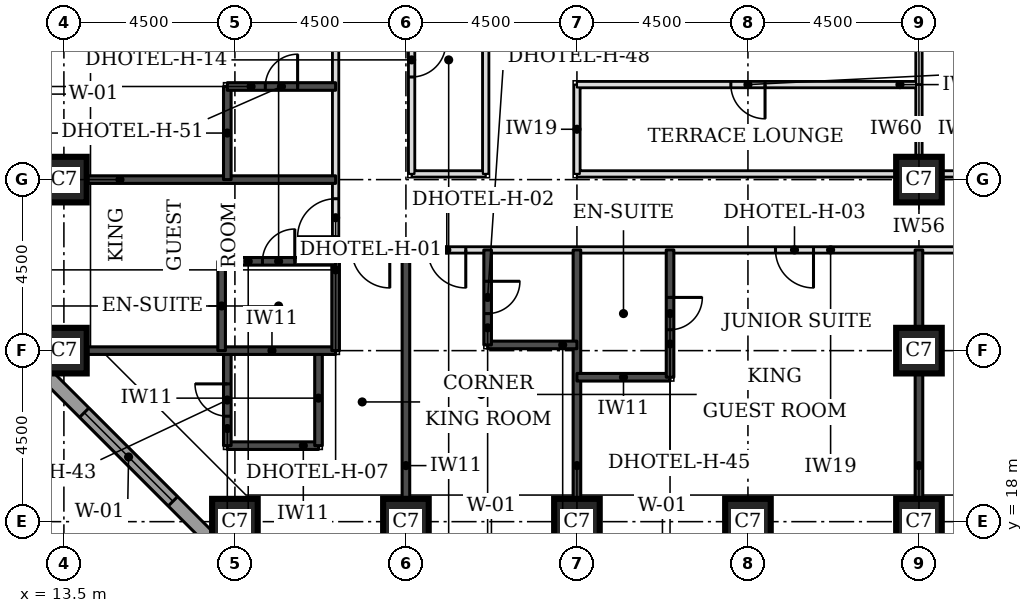
"""IFC4 building model, lengths in metres.
Left out: names, types, materials, properties, quantities, classifications, styles, units other than length and angle.
Written with IfcOpenShell. Run it as: python <this file> out.ifc"""

import sys

from ifc_helpers import new_model, si_unit, direction, frame, frame_2d, origin, origin_2d, place, context, subcontext, project, spatial, rectangle, extrude, element, fill, save


model = new_model("IFC4")
c1 = context("Model", 3, precision=1e-05, world=origin(), true_north=direction((0.0, 1.0)))
c2 = subcontext(c1, "Body", "Model", "MODEL_VIEW")
j1 = project(units=[si_unit("LENGTHUNIT", "METRE"), si_unit("PLANEANGLEUNIT", "RADIAN")], contexts=[c1])
p1 = place(None, origin())
s1 = spatial("IfcSite", under=j1, at=p1, CompositionType="ELEMENT")
p2 = place(p1, origin())
s2 = spatial("IfcBuilding", under=s1, at=p2, CompositionType="ELEMENT")
p3 = place(p2, frame((0.0, 0.0, 46.2)))
s3 = spatial("IfcBuildingStorey", under=s2, at=p3, CompositionType="ELEMENT", Elevation=46.2)
for number, where, z_axis, x_axis in (
    (1, (18.0, 18.0, 0.0), (0.0, 0.0, 1.0), (1.0, 0.0, 0.0)),
    (2, (22.5, 18.0, 0.0), (0.0, 0.0, 1.0), (1.0, 0.0, 0.0)),
    (3, (27.0, 18.0, 0.0), (0.0, 0.0, 1.0), (1.0, 0.0, 0.0)),
    (4, (31.5, 18.0, 0.0), (0.0, 0.0, 1.0), (1.0, 0.0, 0.0)),
    (5, (36.0, 18.0, 0.0), (0.0, 0.0, 1.0), (1.0, 0.0, 0.0)),
    (6, (13.5, 22.5, 0.0), (0.0, 0.0, 1.0), (1.0, 0.0, 0.0)),
    (7, (36.0, 22.5, 0.0), (0.0, 0.0, 1.0), (1.0, 0.0, 0.0)),
    (8, (13.5, 27.0, 0.0), (0.0, 0.0, 1.0), (1.0, 0.0, 0.0)),
    (9, (36.0, 27.0, 0.0), (0.0, 0.0, 1.0), (1.0, 0.0, 0.0)),
):
    element("IfcColumn", number, at=place(p3, frame(where, z_axis=z_axis, x_axis=x_axis)), inside=s3, PredefinedType="COLUMN", context=c2, shape_type="SweptSolid", body=[
        extrude(rectangle(XDim=1.2, YDim=1.2, at=origin_2d()), origin(), (0.0, 0.0, 1.0), 3.3),
    ])
p4 = place(p3, frame((12.674, 22.23, 0.0), z_axis=(0.0, 0.0, 1.0), x_axis=(0.707106781187, -0.707106781187, 0.0)))
e10 = element("IfcWall", 10, at=p4, inside=s3, PredefinedType="STANDARD", context=c2, shape_type="SweptSolid", body=[
    extrude(rectangle(XDim=7.151, YDim=0.35, at=frame_2d((3.576, 0.0))), origin(), (0.0, 0.0, 1.0), 3.055),
])
p5 = place(p4, frame((1.926, 0.0, 0.8)))
e11 = element("IfcOpeningElement", 11, at=p5, cuts=e10, PredefinedType="OPENING", context=c2, shape_type="SweptSolid", body=[
    extrude(rectangle(XDim=3.3, YDim=1.5, at=frame_2d((1.65, 0.75))), frame((0.0, 0.185, 0.0), z_axis=(0.0, -1.0, 0.0), x_axis=(1.0, 0.0, 0.0)), (0.0, 0.0, 1.0), 0.37),
])
p6 = place(p3, frame((20.65, 25.15, 0.0), z_axis=(0.0, 0.0, 1.0), x_axis=(1.0, 0.0, 0.0)))
e12 = element("IfcWall", 12, at=p6, inside=s3, PredefinedType="PARTITIONING", context=c2, shape_type="SweptSolid", body=[
    extrude(rectangle(XDim=30.85, YDim=0.15, at=frame_2d((15.425, 0.0))), origin(), (0.0, 0.0, 1.0), 3.08),
])
p7 = place(p6, frame((2.425, 0.0, 0.0)))
e13 = element("IfcOpeningElement", 13, at=p7, cuts=e12, PredefinedType="OPENING", context=c2, shape_type="SweptSolid", body=[
    extrude(rectangle(XDim=1.0, YDim=2.1, at=frame_2d((0.5, 1.05))), frame((0.0, 0.085, 0.0), z_axis=(0.0, -1.0, 0.0), x_axis=(1.0, 0.0, 0.0)), (0.0, 0.0, 1.0), 0.17),
])
p8 = place(p6, frame((11.575, 0.0, 0.0)))
e14 = element("IfcOpeningElement", 14, at=p8, cuts=e12, PredefinedType="OPENING", context=c2, shape_type="SweptSolid", body=[
    extrude(rectangle(XDim=1.0, YDim=2.1, at=frame_2d((0.5, 1.05))), frame((0.0, 0.085, 0.0), z_axis=(0.0, -1.0, 0.0), x_axis=(1.0, 0.0, 0.0)), (0.0, 0.0, 1.0), 0.17),
])
p9 = place(p6, frame((17.875, 0.0, 0.0)))
e15 = element("IfcOpeningElement", 15, at=p9, cuts=e12, PredefinedType="OPENING", context=c2, shape_type="SweptSolid", body=[
    extrude(rectangle(XDim=1.0, YDim=2.1, at=frame_2d((0.5, 1.05))), frame((0.0, 0.085, 0.0), z_axis=(0.0, -1.0, 0.0), x_axis=(1.0, 0.0, 0.0)), (0.0, 0.0, 1.0), 0.17),
])
p10 = place(p6, frame((27.025, 0.0, 0.0)))
e16 = element("IfcOpeningElement", 16, at=p10, cuts=e12, PredefinedType="OPENING", context=c2, shape_type="SweptSolid", body=[
    extrude(rectangle(XDim=1.0, YDim=2.1, at=frame_2d((0.5, 1.05))), frame((0.0, 0.085, 0.0), z_axis=(0.0, -1.0, 0.0), x_axis=(1.0, 0.0, 0.0)), (0.0, 0.0, 1.0), 0.17),
])
p11 = place(p6, frame((0.425, 0.0, 0.0)))
e17 = element("IfcOpeningElement", 17, at=p11, cuts=e12, PredefinedType="OPENING", context=c2, shape_type="SweptSolid", body=[
    extrude(rectangle(XDim=1.0, YDim=2.1, at=frame_2d((0.5, 1.05))), frame((0.0, 0.085, 0.0), z_axis=(0.0, -1.0, 0.0), x_axis=(1.0, 0.0, 0.0)), (0.0, 0.0, 1.0), 0.17),
])
p12 = place(p6, frame((29.35, 0.0, 0.0)))
e18 = element("IfcOpeningElement", 18, at=p12, cuts=e12, PredefinedType="OPENING", context=c2, shape_type="SweptSolid", body=[
    extrude(rectangle(XDim=1.0, YDim=2.1, at=frame_2d((0.5, 1.05))), frame((0.0, 0.085, 0.0), z_axis=(0.0, -1.0, 0.0), x_axis=(1.0, 0.0, 0.0)), (0.0, 0.0, 1.0), 0.17),
])
p13 = place(p3, frame((20.65, 25.15, 0.0), z_axis=(0.0, 0.0, 1.0), x_axis=(0.0, 1.0, 0.0)))
e19 = element("IfcWall", 19, at=p13, inside=s3, PredefinedType="PARTITIONING", context=c2, shape_type="SweptSolid", body=[
    extrude(rectangle(XDim=24.35, YDim=0.15, at=frame_2d((12.175, 0.0))), origin(), (0.0, 0.0, 1.0), 3.08),
])
p14 = place(p13, frame((0.347, 0.0, 0.0)))
e20 = element("IfcOpeningElement", 20, at=p14, cuts=e19, PredefinedType="OPENING", context=c2, shape_type="SweptSolid", body=[
    extrude(rectangle(XDim=1.0, YDim=2.1, at=frame_2d((0.5, 1.05))), frame((0.0, 0.085, 0.0), z_axis=(0.0, -1.0, 0.0), x_axis=(1.0, 0.0, 0.0)), (0.0, 0.0, 1.0), 0.17),
])
p15 = place(p13, frame((7.075, 0.0, 0.0)))
e21 = element("IfcOpeningElement", 21, at=p15, cuts=e19, PredefinedType="OPENING", context=c2, shape_type="SweptSolid", body=[
    extrude(rectangle(XDim=1.0, YDim=2.1, at=frame_2d((0.5, 1.05))), frame((0.0, 0.085, 0.0), z_axis=(0.0, -1.0, 0.0), x_axis=(1.0, 0.0, 0.0)), (0.0, 0.0, 1.0), 0.17),
])
p16 = place(p13, frame((13.375, 0.0, 0.0)))
e22 = element("IfcOpeningElement", 22, at=p16, cuts=e19, PredefinedType="OPENING", context=c2, shape_type="SweptSolid", body=[
    extrude(rectangle(XDim=1.0, YDim=2.1, at=frame_2d((0.5, 1.05))), frame((0.0, 0.085, 0.0), z_axis=(0.0, -1.0, 0.0), x_axis=(1.0, 0.0, 0.0)), (0.0, 0.0, 1.0), 0.17),
])
p17 = place(p13, frame((21.54, 0.0, 0.0)))
e23 = element("IfcOpeningElement", 23, at=p17, cuts=e19, PredefinedType="OPENING", context=c2, shape_type="SweptSolid", body=[
    extrude(rectangle(XDim=0.9, YDim=2.1, at=frame_2d((0.45, 1.05))), frame((0.0, 0.085, 0.0), z_axis=(0.0, -1.0, 0.0), x_axis=(1.0, 0.0, 0.0)), (0.0, 0.0, 1.0), 0.17),
])
p18 = place(p3, frame((22.65, 27.15, 0.0), z_axis=(0.0, 0.0, 1.0), x_axis=(1.0, 0.0, 0.0)))
e24 = element("IfcWall", 24, at=p18, inside=s3, PredefinedType="PARTITIONING", context=c2, shape_type="SweptSolid", body=[
    extrude(rectangle(XDim=1.95, YDim=0.15, at=frame_2d((0.975, 0.0))), origin(), (0.0, 0.0, 1.0), 3.08),
])
p19 = place(p3, frame((22.65, 27.15, 0.0), z_axis=(0.0, 0.0, 1.0), x_axis=(0.0, 1.0, 0.0)))
e25 = element("IfcWall", 25, at=p19, inside=s3, PredefinedType="PARTITIONING", context=c2, shape_type="SweptSolid", body=[
    extrude(rectangle(XDim=15.85, YDim=0.15, at=frame_2d((7.925, 0.0))), origin(), (0.0, 0.0, 1.0), 3.08),
])
p20 = place(p19, frame((2.55, 0.0, 0.0)))
e26 = element("IfcOpeningElement", 26, at=p20, cuts=e25, PredefinedType="OPENING", context=c2, shape_type="SweptSolid", body=[
    extrude(rectangle(XDim=0.9, YDim=2.1, at=frame_2d((0.45, 1.05))), frame((0.0, 0.085, 0.0), z_axis=(0.0, -1.0, 0.0), x_axis=(1.0, 0.0, 0.0)), (0.0, 0.0, 1.0), 0.17),
])
p21 = place(p19, frame((9.225, 0.0, 0.0)))
e27 = element("IfcOpeningElement", 27, at=p21, cuts=e25, PredefinedType="OPENING", context=c2, shape_type="SweptSolid", body=[
    extrude(rectangle(XDim=0.9, YDim=2.1, at=frame_2d((0.45, 1.05))), frame((0.0, 0.085, 0.0), z_axis=(0.0, -1.0, 0.0), x_axis=(1.0, 0.0, 0.0)), (0.0, 0.0, 1.0), 0.17),
])
p22 = place(p3, frame((24.6, 27.15, 0.0), z_axis=(0.0, 0.0, 1.0), x_axis=(0.0, 1.0, 0.0)))
e28 = element("IfcWall", 28, at=p22, inside=s3, PredefinedType="PARTITIONING", context=c2, shape_type="SweptSolid", body=[
    extrude(rectangle(XDim=13.35, YDim=0.15, at=frame_2d((6.675, 0.0))), origin(), (0.0, 0.0, 1.0), 3.08),
])
p23 = place(p3, frame((27.0, 27.15, 0.0), z_axis=(0.0, 0.0, 1.0), x_axis=(1.0, 0.0, 0.0)))
e29 = element("IfcWall", 29, at=p23, inside=s3, PredefinedType="PARTITIONING", context=c2, shape_type="SweptSolid", body=[
    extrude(rectangle(XDim=11.5, YDim=0.15, at=frame_2d((5.75, 0.0))), origin(), (0.0, 0.0, 1.0), 3.08),
])
p24 = place(p3, frame((27.0, 27.15, 0.0), z_axis=(0.0, 0.0, 1.0), x_axis=(0.0, 1.0, 0.0)))
e30 = element("IfcWall", 30, at=p24, inside=s3, PredefinedType="PARTITIONING", context=c2, shape_type="SweptSolid", body=[
    extrude(rectangle(XDim=2.35, YDim=0.15, at=frame_2d((1.175, 0.0))), origin(), (0.0, 0.0, 1.0), 3.08),
])
p25 = place(p3, frame((27.0, 29.5, 0.0), z_axis=(0.0, 0.0, 1.0), x_axis=(1.0, 0.0, 0.0)))
e31 = element("IfcWall", 31, at=p25, inside=s3, PredefinedType="PARTITIONING", context=c2, shape_type="SweptSolid", body=[
    extrude(rectangle(XDim=9.0, YDim=0.15, at=frame_2d((4.5, 0.0))), origin(), (0.0, 0.0, 1.0), 3.08),
])
p26 = place(p25, frame((4.05, 0.0, 0.0)))
e32 = element("IfcOpeningElement", 32, at=p26, cuts=e31, PredefinedType="OPENING", context=c2, shape_type="SweptSolid", body=[
    extrude(rectangle(XDim=0.9, YDim=2.1, at=frame_2d((0.45, 1.05))), frame((0.0, 0.085, 0.0), z_axis=(0.0, -1.0, 0.0), x_axis=(1.0, 0.0, 0.0)), (0.0, 0.0, 1.0), 0.17),
])
p27 = place(p3, frame((36.0, 29.5, 0.0), z_axis=(0.0, 0.0, 1.0), x_axis=(0.0, 1.0, 0.0)))
e33 = element("IfcWall", 33, at=p27, inside=s3, PredefinedType="PARTITIONING", context=c2, shape_type="SweptSolid", body=[
    extrude(rectangle(XDim=1.95, YDim=0.15, at=frame_2d((0.975, 0.0))), origin(), (0.0, 0.0, 1.0), 2.33),
])
for number, where, z_axis, x_axis in (
    (34, (22.5, 18.6, 0.0), (0.0, 0.0, 1.0), (0.0, 1.0, 0.0)),
    (35, (27.0, 18.6, 0.0), (0.0, 0.0, 1.0), (0.0, 1.0, 0.0)),
    (36, (36.0, 18.6, 0.0), (0.0, 0.0, 1.0), (0.0, 1.0, 0.0)),
):
    element("IfcWall", number, at=place(p3, frame(where, z_axis=z_axis, x_axis=x_axis)), inside=s3, PredefinedType="SOLIDWALL", context=c2, shape_type="SweptSolid", body=[
        extrude(rectangle(XDim=6.55, YDim=0.2, at=frame_2d((3.275, 0.0))), origin(), (0.0, 0.0, 1.0), 3.08),
    ])
p28 = place(p3, frame((17.8, 20.0, 0.0), z_axis=(0.0, 0.0, 1.0), x_axis=(1.0, 0.0, 0.0)))
e37 = element("IfcWall", 37, at=p28, inside=s3, PredefinedType="SOLIDWALL", context=c2, shape_type="SweptSolid", body=[
    extrude(rectangle(XDim=2.4, YDim=0.2, at=frame_2d((1.2, 0.0))), origin(), (0.0, 0.0, 1.0), 3.08),
])
p29 = place(p3, frame((17.8, 20.0, 0.0), z_axis=(0.0, 0.0, 1.0), x_axis=(0.0, 1.0, 0.0)))
e38 = element("IfcWall", 38, at=p29, inside=s3, PredefinedType="SOLIDWALL", context=c2, shape_type="SweptSolid", body=[
    extrude(rectangle(XDim=2.5, YDim=0.2, at=frame_2d((1.25, 0.0))), origin(), (0.0, 0.0, 1.0), 3.08),
])
p30 = place(p29, frame((0.775, 0.0, 0.0)))
e39 = element("IfcOpeningElement", 39, at=p30, cuts=e38, PredefinedType="OPENING", context=c2, shape_type="SweptSolid", body=[
    extrude(rectangle(XDim=0.85, YDim=2.1, at=frame_2d((0.425, 1.05))), frame((0.0, 0.11, 0.0), z_axis=(0.0, -1.0, 0.0), x_axis=(1.0, 0.0, 0.0)), (0.0, 0.0, 1.0), 0.22),
])
p31 = place(p3, frame((20.2, 20.0, 0.0), z_axis=(0.0, 0.0, 1.0), x_axis=(0.0, 1.0, 0.0)))
e40 = element("IfcWall", 40, at=p31, inside=s3, PredefinedType="SOLIDWALL", context=c2, shape_type="SweptSolid", body=[
    extrude(rectangle(XDim=2.5, YDim=0.2, at=frame_2d((1.25, 0.0))), origin(), (0.0, 0.0, 1.0), 3.08),
])
p32 = place(p3, frame((27.0, 21.8, 0.0), z_axis=(0.0, 0.0, 1.0), x_axis=(1.0, 0.0, 0.0)))
e41 = element("IfcWall", 41, at=p32, inside=s3, PredefinedType="SOLIDWALL", context=c2, shape_type="SweptSolid", body=[
    extrude(rectangle(XDim=2.45, YDim=0.2, at=frame_2d((1.225, 0.0))), origin(), (0.0, 0.0, 1.0), 3.08),
])
p33 = place(p3, frame((29.45, 21.8, 0.0), z_axis=(0.0, 0.0, 1.0), x_axis=(0.0, 1.0, 0.0)))
e42 = element("IfcWall", 42, at=p33, inside=s3, PredefinedType="SOLIDWALL", context=c2, shape_type="SweptSolid", body=[
    extrude(rectangle(XDim=3.35, YDim=0.2, at=frame_2d((1.675, 0.0))), origin(), (0.0, 0.0, 1.0), 3.08),
])
p34 = place(p33, frame((1.25, 0.0, 0.0)))
e43 = element("IfcOpeningElement", 43, at=p34, cuts=e42, PredefinedType="OPENING", context=c2, shape_type="SweptSolid", body=[
    extrude(rectangle(XDim=0.85, YDim=2.1, at=frame_2d((0.425, 1.05))), frame((0.0, 0.11, 0.0), z_axis=(0.0, -1.0, 0.0), x_axis=(1.0, 0.0, 0.0)), (0.0, 0.0, 1.0), 0.22),
])
p35 = place(p3, frame((14.1, 22.5, 0.0), z_axis=(0.0, 0.0, 1.0), x_axis=(1.0, 0.0, 0.0)))
e44 = element("IfcWall", 44, at=p35, inside=s3, PredefinedType="SOLIDWALL", context=c2, shape_type="SweptSolid", body=[
    extrude(rectangle(XDim=6.55, YDim=0.2, at=frame_2d((3.275, 0.0))), origin(), (0.0, 0.0, 1.0), 3.08),
])
p36 = place(p3, frame((17.65, 22.5, 0.0), z_axis=(0.0, 0.0, 1.0), x_axis=(0.0, 1.0, 0.0)))
e45 = element("IfcWall", 45, at=p36, inside=s3, PredefinedType="SOLIDWALL", context=c2, shape_type="SweptSolid", body=[
    extrude(rectangle(XDim=2.35, YDim=0.2, at=frame_2d((1.175, 0.0))), origin(), (0.0, 0.0, 1.0), 3.08),
])
p37 = place(p3, frame((20.65, 22.5, 0.0), z_axis=(0.0, 0.0, 1.0), x_axis=(0.0, 1.0, 0.0)))
e46 = element("IfcWall", 46, at=p37, inside=s3, PredefinedType="SOLIDWALL", context=c2, shape_type="SweptSolid", body=[
    extrude(rectangle(XDim=2.65, YDim=0.2, at=frame_2d((1.325, 0.0))), origin(), (0.0, 0.0, 1.0), 3.08),
])
p38 = place(p3, frame((24.65, 22.65, 0.0), z_axis=(0.0, 0.0, 1.0), x_axis=(1.0, 0.0, 0.0)))
e47 = element("IfcWall", 47, at=p38, inside=s3, PredefinedType="SOLIDWALL", context=c2, shape_type="SweptSolid", body=[
    extrude(rectangle(XDim=2.35, YDim=0.2, at=frame_2d((1.175, 0.0))), origin(), (0.0, 0.0, 1.0), 3.08),
])
p39 = place(p3, frame((24.65, 22.65, 0.0), z_axis=(0.0, 0.0, 1.0), x_axis=(0.0, 1.0, 0.0)))
e48 = element("IfcWall", 48, at=p39, inside=s3, PredefinedType="SOLIDWALL", context=c2, shape_type="SweptSolid", body=[
    extrude(rectangle(XDim=2.5, YDim=0.2, at=frame_2d((1.25, 0.0))), origin(), (0.0, 0.0, 1.0), 3.08),
])
p40 = place(p39, frame((0.825, 0.0, 0.0)))
e49 = element("IfcOpeningElement", 49, at=p40, cuts=e48, PredefinedType="OPENING", context=c2, shape_type="SweptSolid", body=[
    extrude(rectangle(XDim=0.85, YDim=2.1, at=frame_2d((0.425, 1.05))), frame((0.0, 0.11, 0.0), z_axis=(0.0, -1.0, 0.0), x_axis=(1.0, 0.0, 0.0)), (0.0, 0.0, 1.0), 0.22),
])
p41 = place(p3, frame((17.65, 24.85, 0.0), z_axis=(0.0, 0.0, 1.0), x_axis=(1.0, 0.0, 0.0)))
e50 = element("IfcWall", 50, at=p41, inside=s3, PredefinedType="SOLIDWALL", context=c2, shape_type="SweptSolid", body=[
    extrude(rectangle(XDim=3.0, YDim=0.2, at=frame_2d((1.5, 0.0))), origin(), (0.0, 0.0, 1.0), 3.08),
])
p42 = place(p41, frame((1.075, 0.0, 0.0)))
e51 = element("IfcOpeningElement", 51, at=p42, cuts=e50, PredefinedType="OPENING", context=c2, shape_type="SweptSolid", body=[
    extrude(rectangle(XDim=0.85, YDim=2.1, at=frame_2d((0.425, 1.05))), frame((0.0, 0.11, 0.0), z_axis=(0.0, -1.0, 0.0), x_axis=(1.0, 0.0, 0.0)), (0.0, 0.0, 1.0), 0.22),
])
p43 = place(p3, frame((14.1, 27.0, 0.0), z_axis=(0.0, 0.0, 1.0), x_axis=(1.0, 0.0, 0.0)))
e52 = element("IfcWall", 52, at=p43, inside=s3, PredefinedType="SOLIDWALL", context=c2, shape_type="SweptSolid", body=[
    extrude(rectangle(XDim=6.55, YDim=0.2, at=frame_2d((3.275, 0.0))), origin(), (0.0, 0.0, 1.0), 3.08),
])
p44 = place(p3, frame((17.8, 27.0, 0.0), z_axis=(0.0, 0.0, 1.0), x_axis=(0.0, 1.0, 0.0)))
e53 = element("IfcWall", 53, at=p44, inside=s3, PredefinedType="SOLIDWALL", context=c2, shape_type="SweptSolid", body=[
    extrude(rectangle(XDim=2.45, YDim=0.2, at=frame_2d((1.225, 0.0))), origin(), (0.0, 0.0, 1.0), 3.08),
])
p45 = place(p3, frame((17.8, 29.45, 0.0), z_axis=(0.0, 0.0, 1.0), x_axis=(1.0, 0.0, 0.0)))
e54 = element("IfcWall", 54, at=p45, inside=s3, PredefinedType="SOLIDWALL", context=c2, shape_type="SweptSolid", body=[
    extrude(rectangle(XDim=2.85, YDim=0.2, at=frame_2d((1.425, 0.0))), origin(), (0.0, 0.0, 1.0), 3.08),
])
p46 = place(p45, frame((1.0, 0.0, 0.0)))
e55 = element("IfcOpeningElement", 55, at=p46, cuts=e54, PredefinedType="OPENING", context=c2, shape_type="SweptSolid", body=[
    extrude(rectangle(XDim=0.85, YDim=2.1, at=frame_2d((0.425, 1.05))), frame((0.0, 0.11, 0.0), z_axis=(0.0, -1.0, 0.0), x_axis=(1.0, 0.0, 0.0)), (0.0, 0.0, 1.0), 0.22),
])
p47 = place(p3, frame((36.0, 27.15, 0.0), z_axis=(0.0, 0.0, 1.0), x_axis=(0.0, 1.0, 0.0)))
e56 = element("IfcWall", 56, at=p47, inside=s3, PredefinedType="PARTITIONING", context=c2, shape_type="SweptSolid", body=[
    extrude(rectangle(XDim=2.35, YDim=0.15, at=frame_2d((1.175, 0.0))), origin(), (0.0, 0.0, 1.0), 2.33),
])
p48 = place(p5, origin())
e57 = element("IfcWindow", 57, at=p48, inside=s3, PartitioningType="SINGLE_PANEL", PredefinedType="WINDOW", context=c2, shape_type="SweptSolid", body=[
    extrude(rectangle(XDim=3.3, YDim=1.5, at=frame_2d((1.65, 0.75))), frame((0.0, 0.085, 0.0), z_axis=(0.0, -1.0, 0.0), x_axis=(1.0, 0.0, 0.0)), (0.0, 0.0, 1.0), 0.06),
])
fill(e11, e57)
p49 = place(p7, frame((1.0, 0.0, 0.0), z_axis=(0.0, 0.0, 1.0), x_axis=(-1.0, 0.0, 0.0)))
e58 = element("IfcDoor", 58, at=p49, inside=s3, OperationType="SINGLE_SWING_LEFT", PredefinedType="DOOR", context=c2, shape_type="SweptSolid", body=[
    extrude(rectangle(XDim=1.0, YDim=2.1, at=frame_2d((0.5, 1.05))), frame((0.0, 0.025, 0.0), z_axis=(0.0, -1.0, 0.0), x_axis=(1.0, 0.0, 0.0)), (0.0, 0.0, 1.0), 0.05),
])
fill(e13, e58)
p50 = place(p40, frame((0.85, 0.0, 0.0), z_axis=(0.0, 0.0, 1.0), x_axis=(-1.0, 0.0, 0.0)))
e59 = element("IfcDoor", 59, at=p50, inside=s3, OperationType="SINGLE_SWING_LEFT", PredefinedType="DOOR", context=c2, shape_type="SweptSolid", body=[
    extrude(rectangle(XDim=0.85, YDim=2.1, at=frame_2d((0.425, 1.05))), frame((0.0, 0.025, 0.0), z_axis=(0.0, -1.0, 0.0), x_axis=(1.0, 0.0, 0.0)), (0.0, 0.0, 1.0), 0.05),
])
fill(e49, e59)
p51 = place(p8, frame((1.0, 0.0, 0.0), z_axis=(0.0, 0.0, 1.0), x_axis=(-1.0, 0.0, 0.0)))
e60 = element("IfcDoor", 60, at=p51, inside=s3, OperationType="SINGLE_SWING_LEFT", PredefinedType="DOOR", context=c2, shape_type="SweptSolid", body=[
    extrude(rectangle(XDim=1.0, YDim=2.1, at=frame_2d((0.5, 1.05))), frame((0.0, 0.025, 0.0), z_axis=(0.0, -1.0, 0.0), x_axis=(1.0, 0.0, 0.0)), (0.0, 0.0, 1.0), 0.05),
])
fill(e14, e60)
p52 = place(p34, frame((0.85, 0.0, 0.0), z_axis=(0.0, 0.0, 1.0), x_axis=(-1.0, 0.0, 0.0)))
e61 = element("IfcDoor", 61, at=p52, inside=s3, OperationType="SINGLE_SWING_LEFT", PredefinedType="DOOR", context=c2, shape_type="SweptSolid", body=[
    extrude(rectangle(XDim=0.85, YDim=2.1, at=frame_2d((0.425, 1.05))), frame((0.0, 0.025, 0.0), z_axis=(0.0, -1.0, 0.0), x_axis=(1.0, 0.0, 0.0)), (0.0, 0.0, 1.0), 0.05),
])
fill(e43, e61)
p53 = place(p14, origin())
e62 = element("IfcDoor", 62, at=p53, inside=s3, OperationType="SINGLE_SWING_LEFT", PredefinedType="DOOR", context=c2, shape_type="SweptSolid", body=[
    extrude(rectangle(XDim=1.0, YDim=2.1, at=frame_2d((0.5, 1.05))), frame((0.0, 0.025, 0.0), z_axis=(0.0, -1.0, 0.0), x_axis=(1.0, 0.0, 0.0)), (0.0, 0.0, 1.0), 0.05),
])
fill(e20, e62)
p54 = place(p42, origin())
e63 = element("IfcDoor", 63, at=p54, inside=s3, OperationType="SINGLE_SWING_RIGHT", PredefinedType="DOOR", context=c2, shape_type="SweptSolid", body=[
    extrude(rectangle(XDim=0.85, YDim=2.1, at=frame_2d((0.425, 1.05))), frame((0.0, 0.025, 0.0), z_axis=(0.0, -1.0, 0.0), x_axis=(1.0, 0.0, 0.0)), (0.0, 0.0, 1.0), 0.05),
])
fill(e51, e63)
p55 = place(p46, origin())
e64 = element("IfcDoor", 64, at=p55, inside=s3, OperationType="SINGLE_SWING_RIGHT", PredefinedType="DOOR", context=c2, shape_type="SweptSolid", body=[
    extrude(rectangle(XDim=0.85, YDim=2.1, at=frame_2d((0.425, 1.05))), frame((0.0, 0.025, 0.0), z_axis=(0.0, -1.0, 0.0), x_axis=(1.0, 0.0, 0.0)), (0.0, 0.0, 1.0), 0.05),
])
fill(e55, e64)
p56 = place(p11, frame((1.0, 0.0, 0.0), z_axis=(0.0, 0.0, 1.0), x_axis=(-1.0, 0.0, 0.0)))
e65 = element("IfcDoor", 65, at=p56, inside=s3, OperationType="SINGLE_SWING_LEFT", PredefinedType="DOOR", context=c2, shape_type="SweptSolid", body=[
    extrude(rectangle(XDim=1.0, YDim=2.1, at=frame_2d((0.5, 1.05))), frame((0.0, 0.025, 0.0), z_axis=(0.0, -1.0, 0.0), x_axis=(1.0, 0.0, 0.0)), (0.0, 0.0, 1.0), 0.05),
])
fill(e17, e65)
p57 = place(p30, origin())
e66 = element("IfcDoor", 66, at=p57, inside=s3, OperationType="SINGLE_SWING_RIGHT", PredefinedType="DOOR", context=c2, shape_type="SweptSolid", body=[
    extrude(rectangle(XDim=0.85, YDim=2.1, at=frame_2d((0.425, 1.05))), frame((0.0, 0.025, 0.0), z_axis=(0.0, -1.0, 0.0), x_axis=(1.0, 0.0, 0.0)), (0.0, 0.0, 1.0), 0.05),
])
fill(e39, e66)
p58 = place(p20, frame((0.9, 0.0, 0.0), z_axis=(0.0, 0.0, 1.0), x_axis=(-1.0, 0.0, 0.0)))
e67 = element("IfcDoor", 67, at=p58, inside=s3, OperationType="SINGLE_SWING_LEFT", PredefinedType="DOOR", context=c2, shape_type="SweptSolid", body=[
    extrude(rectangle(XDim=0.9, YDim=2.1, at=frame_2d((0.45, 1.05))), frame((0.0, 0.025, 0.0), z_axis=(0.0, -1.0, 0.0), x_axis=(1.0, 0.0, 0.0)), (0.0, 0.0, 1.0), 0.05),
])
fill(e26, e67)
p59 = place(p26, frame((0.9, 0.0, 0.0), z_axis=(0.0, 0.0, 1.0), x_axis=(-1.0, 0.0, 0.0)))
e68 = element("IfcDoor", 68, at=p59, inside=s3, OperationType="SINGLE_SWING_LEFT", PredefinedType="DOOR", context=c2, shape_type="SweptSolid", body=[
    extrude(rectangle(XDim=0.9, YDim=2.1, at=frame_2d((0.45, 1.05))), frame((0.0, 0.025, 0.0), z_axis=(0.0, -1.0, 0.0), x_axis=(1.0, 0.0, 0.0)), (0.0, 0.0, 1.0), 0.05),
])
fill(e32, e68)
save(model, sys.argv[1])
